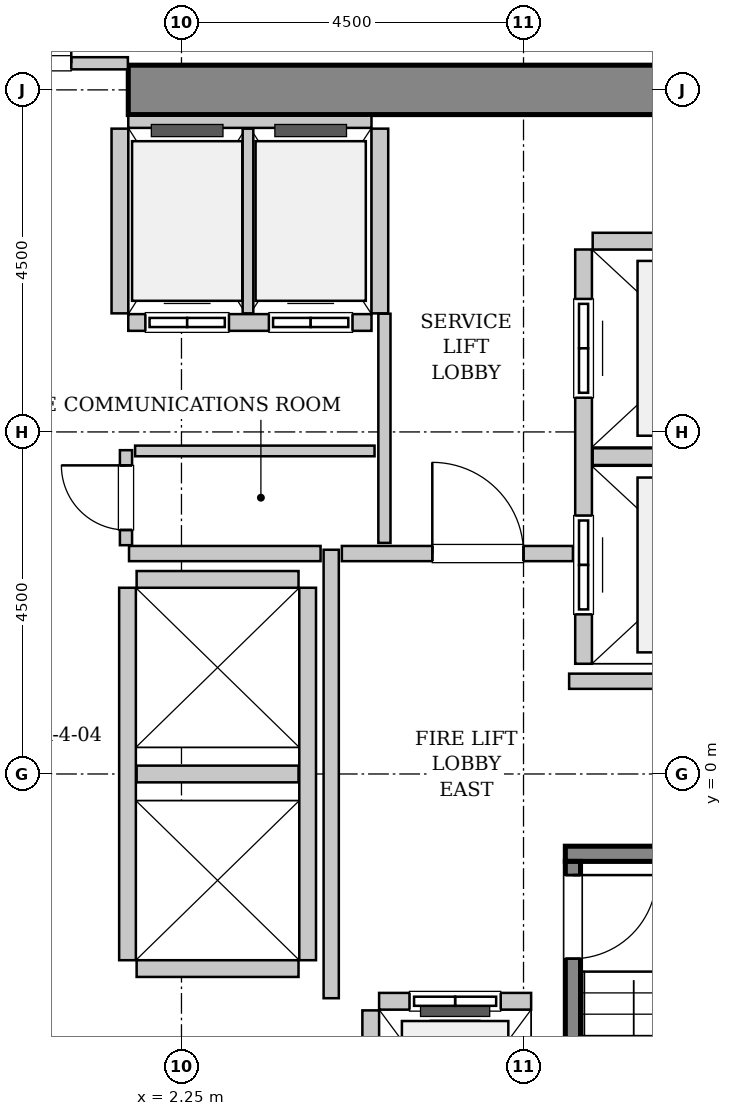
"""IFC4 building model, lengths in metres.
Left out: names, types, materials, properties, quantities, classifications, styles, units other than length and angle.
Written with IfcOpenShell. Run it as: python <this file> out.ifc"""

import sys

from ifc_helpers import new_model, si_unit, direction, frame, frame_2d, origin, place, context, subcontext, project, spatial, rectangle, extrude, source, transform, mapped, element, fill, save


model = new_model("IFC4")
c1 = context("Model", 3, precision=1e-05, world=origin(), true_north=direction((0.0, 1.0)))
c2 = subcontext(c1, "Body", "Model", "MODEL_VIEW")
j1 = project(units=[si_unit("LENGTHUNIT", "METRE"), si_unit("PLANEANGLEUNIT", "RADIAN")], contexts=[c1])
p1 = place(None, origin())
s1 = spatial("IfcSite", under=j1, at=p1, CompositionType="ELEMENT")
p2 = place(p1, origin())
s2 = spatial("IfcBuilding", under=s1, at=p2, CompositionType="ELEMENT")
p3 = place(p2, frame((0.0, 0.0, 22.2)))
s3 = spatial("IfcBuildingStorey", under=s2, at=p3, CompositionType="ELEMENT", Elevation=22.2)
m1 = source(origin(), c2, "Body", "SweptSolid", [
    extrude(rectangle(XDim=10.025, YDim=0.65, at=frame_2d((5.012, 0.0))), origin(), (0.0, 0.0, 1.0), 5.4),
])
p4 = place(p3, frame((1.55, 9.0, 0.0), z_axis=(0.0, 0.0, 1.0), x_axis=(1.0, 0.0, 0.0)))
e1 = element("IfcWall", 1, at=p4, inside=s3, PredefinedType="SHEAR", context=c2, shape_type="MappedRepresentation", body=[
    mapped(m1, transform((0.0, 0.0, 0.0), x_axis=(1.0, 0.0, 0.0), y_axis=(0.0, 1.0, 0.0), z_axis=(0.0, 0.0, 1.0), scale=1.0)),
])
m2 = source(origin(), c2, "Body", "SweptSolid", [
    extrude(rectangle(XDim=3.4, YDim=0.2, at=frame_2d((1.7, 0.0))), origin(), (0.0, 0.0, 1.0), 5.4),
])
p5 = place(p3, frame((7.3, -1.05, 0.0), z_axis=(0.0, 0.0, 1.0), x_axis=(1.0, 0.0, 0.0)))
e2 = element("IfcWall", 2, at=p5, inside=s3, PredefinedType="SOLIDWALL", context=c2, shape_type="MappedRepresentation", body=[
    mapped(m2, transform((0.0, 0.0, 0.0), x_axis=(1.0, 0.0, 0.0), y_axis=(0.0, 1.0, 0.0), z_axis=(0.0, 0.0, 1.0), scale=1.0)),
])
m3 = source(origin(), c2, "Body", "SweptSolid", [
    extrude(rectangle(XDim=7.1, YDim=0.2, at=frame_2d((3.55, 0.0))), origin(), (0.0, 0.0, 1.0), 5.4),
])
p6 = place(p3, frame((7.4, -1.15, 0.0), z_axis=(0.0, 0.0, 1.0), x_axis=(0.0, -1.0, 0.0)))
e3 = element("IfcWall", 3, at=p6, inside=s3, PredefinedType="SOLIDWALL", context=c2, shape_type="MappedRepresentation", body=[
    mapped(m3, transform((0.0, 0.0, 0.0), x_axis=(1.0, 0.0, 0.0), y_axis=(0.0, 1.0, 0.0), z_axis=(0.0, 0.0, 1.0), scale=1.0)),
])
p7 = place(p6, frame((0.18, 0.0, 0.0)))
e4 = element("IfcOpeningElement", 4, at=p7, cuts=e3, PredefinedType="OPENING", context=c2, shape_type="SweptSolid", body=[
    extrude(rectangle(XDim=1.1, YDim=2.15, at=frame_2d((0.55, 1.075))), frame((0.0, 0.11, 0.0), z_axis=(0.0, -1.0, 0.0), x_axis=(1.0, 0.0, 0.0)), (0.0, 0.0, 1.0), 0.22),
])
m4 = source(origin(), c2, "Body", "SweptSolid", [
    extrude(rectangle(XDim=2.0, YDim=0.22, at=frame_2d((1.0, 0.0))), origin(), (0.0, 0.0, 1.0), 4.905),
])
p8 = place(p3, frame((6.85, -2.99, 0.0), z_axis=(0.0, 0.0, 1.0), x_axis=(-1.0, 0.0, 0.0)))
e5 = element("IfcWall", 5, at=p8, inside=s3, PredefinedType="SOLIDWALL", context=c2, shape_type="MappedRepresentation", body=[
    mapped(m4, transform((0.0, 0.0, 0.0), x_axis=(1.0, 0.0, 0.0), y_axis=(0.0, 1.0, 0.0), z_axis=(0.0, 0.0, 1.0), scale=1.0)),
])
p9 = place(p8, frame((0.4, 0.0, 0.0)))
e6 = element("IfcOpeningElement", 6, at=p9, cuts=e5, PredefinedType="OPENING", context=c2, shape_type="SweptSolid", body=[
    extrude(rectangle(XDim=1.2, YDim=2.2, at=frame_2d((0.6, 1.1))), frame((0.0, 0.12, 0.0), z_axis=(0.0, -1.0, 0.0), x_axis=(1.0, 0.0, 0.0)), (0.0, 0.0, 1.0), 0.24),
])
m5 = source(origin(), c2, "Body", "SweptSolid", [
    extrude(rectangle(XDim=2.68, YDim=0.22, at=frame_2d((1.34, 0.0))), origin(), (0.0, 0.0, 1.0), 4.905),
])
p10 = place(p3, frame((4.74, -3.11, 0.0), z_axis=(0.0, 0.0, 1.0), x_axis=(0.0, -1.0, 0.0)))
e7 = element("IfcWall", 7, at=p10, inside=s3, PredefinedType="SOLIDWALL", context=c2, shape_type="MappedRepresentation", body=[
    mapped(m5, transform((0.0, 0.0, 0.0), x_axis=(1.0, 0.0, 0.0), y_axis=(0.0, 1.0, 0.0), z_axis=(0.0, 0.0, 1.0), scale=1.0)),
])
m6 = source(origin(), c2, "Body", "SweptSolid", [
    extrude(rectangle(XDim=5.45, YDim=0.22, at=frame_2d((2.725, 0.0))), origin(), (0.0, 0.0, 1.0), 4.905),
])
p11 = place(p3, frame((7.54, 6.9, 0.0), z_axis=(0.0, 0.0, 1.0), x_axis=(0.0, -1.0, 0.0)))
e8 = element("IfcWall", 8, at=p11, inside=s3, PredefinedType="SOLIDWALL", context=c2, shape_type="MappedRepresentation", body=[
    mapped(m6, transform((0.0, 0.0, 0.0), x_axis=(1.0, 0.0, 0.0), y_axis=(0.0, 1.0, 0.0), z_axis=(0.0, 0.0, 1.0), scale=1.0)),
])
p12 = place(p11, frame((3.5, 0.0, 0.0)))
e9 = element("IfcOpeningElement", 9, at=p12, cuts=e8, PredefinedType="OPENING", context=c2, shape_type="SweptSolid", body=[
    extrude(rectangle(XDim=1.3, YDim=2.3, at=frame_2d((0.65, 1.15))), frame((0.0, 0.12, 0.0), z_axis=(0.0, -1.0, 0.0), x_axis=(1.0, 0.0, 0.0)), (0.0, 0.0, 1.0), 0.24),
])
p13 = place(p11, frame((0.65, 0.0, 0.0)))
e10 = element("IfcOpeningElement", 10, at=p13, cuts=e8, PredefinedType="OPENING", context=c2, shape_type="SweptSolid", body=[
    extrude(rectangle(XDim=1.3, YDim=2.3, at=frame_2d((0.65, 1.15))), frame((0.0, 0.12, 0.0), z_axis=(0.0, -1.0, 0.0), x_axis=(1.0, 0.0, 0.0)), (0.0, 0.0, 1.0), 0.24),
])
m7 = source(origin(), c2, "Body", "SweptSolid", [
    extrude(rectangle(XDim=2.78, YDim=0.22, at=frame_2d((1.39, 0.0))), origin(), (0.0, 0.0, 1.0), 4.905),
])
for number, where, z_axis, x_axis in (
    (11, (7.66, 4.175, 0.0), (0.0, 0.0, 1.0), (1.0, 0.0, 0.0)),
    (12, (10.44, 7.01, 0.0), (0.0, 0.0, 1.0), (-1.0, 0.0, 0.0)),
):
    element("IfcWall", number, at=place(p3, frame(where, z_axis=z_axis, x_axis=x_axis)), inside=s3, PredefinedType="SOLIDWALL", context=c2, shape_type="MappedRepresentation", body=[
        mapped(m7, transform((0.0, 0.0, 0.0), x_axis=(1.0, 0.0, 0.0), y_axis=(0.0, 1.0, 0.0), z_axis=(0.0, 0.0, 1.0), scale=1.0)),
    ])
m8 = source(origin(), c2, "Body", "SweptSolid", [
    extrude(rectangle(XDim=3.2, YDim=0.22, at=frame_2d((1.6, 0.0))), origin(), (0.0, 0.0, 1.0), 4.905),
])
p14 = place(p3, frame((1.55, 5.94, 0.0), z_axis=(0.0, 0.0, 1.0), x_axis=(1.0, 0.0, 0.0)))
e13 = element("IfcWall", 13, at=p14, inside=s3, PredefinedType="SOLIDWALL", context=c2, shape_type="MappedRepresentation", body=[
    mapped(m8, transform((0.0, 0.0, 0.0), x_axis=(1.0, 0.0, 0.0), y_axis=(0.0, 1.0, 0.0), z_axis=(0.0, 0.0, 1.0), scale=1.0)),
])
p15 = place(p14, frame((0.225, 0.0, 0.0)))
e14 = element("IfcOpeningElement", 14, at=p15, cuts=e13, PredefinedType="OPENING", context=c2, shape_type="SweptSolid", body=[
    extrude(rectangle(XDim=1.1, YDim=2.2, at=frame_2d((0.55, 1.1))), frame((0.0, 0.12, 0.0), z_axis=(0.0, -1.0, 0.0), x_axis=(1.0, 0.0, 0.0)), (0.0, 0.0, 1.0), 0.24),
])
p16 = place(p14, frame((1.85, 0.0, 0.0)))
e15 = element("IfcOpeningElement", 15, at=p16, cuts=e13, PredefinedType="OPENING", context=c2, shape_type="SweptSolid", body=[
    extrude(rectangle(XDim=1.1, YDim=2.2, at=frame_2d((0.55, 1.1))), frame((0.0, 0.12, 0.0), z_axis=(0.0, -1.0, 0.0), x_axis=(1.0, 0.0, 0.0)), (0.0, 0.0, 1.0), 0.24),
])
m9 = source(origin(), c2, "Body", "SweptSolid", [
    extrude(rectangle(XDim=3.2, YDim=0.16, at=frame_2d((1.6, 0.0))), origin(), (0.0, 0.0, 1.0), 3.795),
])
p17 = place(p3, frame((4.75, 8.58, 0.0), z_axis=(0.0, 0.0, 1.0), x_axis=(-1.0, 0.0, 0.0)))
e16 = element("IfcWall", 16, at=p17, inside=s3, PredefinedType="PARTITIONING", context=c2, shape_type="MappedRepresentation", body=[
    mapped(m9, transform((0.0, 0.0, 0.0), x_axis=(1.0, 0.0, 0.0), y_axis=(0.0, 1.0, 0.0), z_axis=(0.0, 0.0, 1.0), scale=1.0)),
])
m10 = source(origin(), c2, "Body", "SweptSolid", [
    extrude(rectangle(XDim=2.43, YDim=0.22, at=frame_2d((1.215, 0.0))), origin(), (0.0, 0.0, 1.0), 4.905),
])
p18 = place(p3, frame((1.44, 8.49, 0.0), z_axis=(0.0, 0.0, 1.0), x_axis=(0.0, -1.0, 0.0)))
e17 = element("IfcWall", 17, at=p18, inside=s3, PredefinedType="SOLIDWALL", context=c2, shape_type="MappedRepresentation", body=[
    mapped(m10, transform((0.0, 0.0, 0.0), x_axis=(1.0, 0.0, 0.0), y_axis=(0.0, 1.0, 0.0), z_axis=(0.0, 0.0, 1.0), scale=1.0)),
])
m11 = source(origin(), c2, "Body", "SweptSolid", [
    extrude(rectangle(XDim=2.43, YDim=0.14, at=frame_2d((1.215, 0.0))), origin(), (0.0, 0.0, 1.0), 4.905),
])
p19 = place(p3, frame((3.125, 6.06, 0.0), z_axis=(0.0, 0.0, 1.0), x_axis=(0.0, 1.0, 0.0)))
e18 = element("IfcWall", 18, at=p19, inside=s3, PredefinedType="PARTITIONING", context=c2, shape_type="MappedRepresentation", body=[
    mapped(m11, transform((0.0, 0.0, 0.0), x_axis=(1.0, 0.0, 0.0), y_axis=(0.0, 1.0, 0.0), z_axis=(0.0, 0.0, 1.0), scale=1.0)),
])
p20 = place(p3, frame((4.86, 6.06, 0.0), z_axis=(0.0, 0.0, 1.0), x_axis=(0.0, 1.0, 0.0)))
e19 = element("IfcWall", 19, at=p20, inside=s3, PredefinedType="SOLIDWALL", context=c2, shape_type="MappedRepresentation", body=[
    mapped(m10, transform((0.0, 0.0, 0.0), x_axis=(1.0, 0.0, 0.0), y_axis=(0.0, 1.0, 0.0), z_axis=(0.0, 0.0, 1.0), scale=1.0)),
])
m12 = source(origin(), c2, "Body", "SweptSolid", [
    extrude(rectangle(XDim=4.9, YDim=0.22, at=frame_2d((2.45, 0.0))), origin(), (0.0, 0.0, 1.0), 4.905),
])
for number, where, z_axis, x_axis in (
    (20, (1.54, 2.45, 0.0), (0.0, 0.0, 1.0), (0.0, -1.0, 0.0)),
    (21, (3.91, -2.45, 0.0), (0.0, 0.0, 1.0), (0.0, 1.0, 0.0)),
):
    element("IfcWall", number, at=place(p3, frame(where, z_axis=z_axis, x_axis=x_axis)), inside=s3, PredefinedType="SOLIDWALL", context=c2, shape_type="MappedRepresentation", body=[
        mapped(m12, transform((0.0, 0.0, 0.0), x_axis=(1.0, 0.0, 0.0), y_axis=(0.0, 1.0, 0.0), z_axis=(0.0, 0.0, 1.0), scale=1.0)),
    ])
m13 = source(origin(), c2, "Body", "SweptSolid", [
    extrude(rectangle(XDim=2.13, YDim=0.22, at=frame_2d((1.065, 0.0))), origin(), (0.0, 0.0, 1.0), 4.905),
])
for number, where, z_axis, x_axis in (
    (22, (1.66, -2.56, 0.0), (0.0, 0.0, 1.0), (1.0, 0.0, 0.0)),
    (23, (1.66, 0.0, 0.0), (0.0, 0.0, 1.0), (1.0, 0.0, 0.0)),
    (24, (3.79, 2.56, 0.0), (0.0, 0.0, 1.0), (-1.0, 0.0, 0.0)),
):
    element("IfcWall", number, at=place(p3, frame(where, z_axis=z_axis, x_axis=x_axis)), inside=s3, PredefinedType="SOLIDWALL", context=c2, shape_type="MappedRepresentation", body=[
        mapped(m13, transform((0.0, 0.0, 0.0), x_axis=(1.0, 0.0, 0.0), y_axis=(0.0, 1.0, 0.0), z_axis=(0.0, 0.0, 1.0), scale=1.0)),
    ])
m14 = source(origin(), c2, "Body", "SweptSolid", [
    extrude(rectangle(XDim=5.9, YDim=0.2, at=frame_2d((2.95, 0.0))), origin(), (0.0, 0.0, 1.0), 4.905),
])
p21 = place(p3, frame((4.22, -2.95, 0.0), z_axis=(0.0, 0.0, 1.0), x_axis=(0.0, 1.0, 0.0)))
e25 = element("IfcWall", 25, at=p21, inside=s3, PredefinedType="PARTITIONING", context=c2, shape_type="MappedRepresentation", body=[
    mapped(m14, transform((0.0, 0.0, 0.0), x_axis=(1.0, 0.0, 0.0), y_axis=(0.0, 1.0, 0.0), z_axis=(0.0, 0.0, 1.0), scale=1.0)),
])
m15 = source(origin(), c2, "Body", "SweptSolid", [
    extrude(rectangle(XDim=2.52, YDim=0.2, at=frame_2d((1.26, 0.0))), origin(), (0.0, 0.0, 1.0), 4.905),
])
p22 = place(p3, frame((1.56, 2.9, 0.0), z_axis=(0.0, 0.0, 1.0), x_axis=(1.0, 0.0, 0.0)))
e26 = element("IfcWall", 26, at=p22, inside=s3, PredefinedType="PARTITIONING", context=c2, shape_type="MappedRepresentation", body=[
    mapped(m15, transform((0.0, 0.0, 0.0), x_axis=(1.0, 0.0, 0.0), y_axis=(0.0, 1.0, 0.0), z_axis=(0.0, 0.0, 1.0), scale=1.0)),
])
m16 = source(origin(), c2, "Body", "SweptSolid", [
    extrude(rectangle(XDim=3.04, YDim=0.2, at=frame_2d((1.52, 0.0))), origin(), (0.0, 0.0, 1.0), 4.905),
])
p23 = place(p3, frame((4.36, 2.9, 0.0), z_axis=(0.0, 0.0, 1.0), x_axis=(1.0, 0.0, 0.0)))
e27 = element("IfcWall", 27, at=p23, inside=s3, PredefinedType="PARTITIONING", context=c2, shape_type="MappedRepresentation", body=[
    mapped(m16, transform((0.0, 0.0, 0.0), x_axis=(1.0, 0.0, 0.0), y_axis=(0.0, 1.0, 0.0), z_axis=(0.0, 0.0, 1.0), scale=1.0)),
])
p24 = place(p23, frame((1.19, 0.0, 0.0)))
e28 = element("IfcOpeningElement", 28, at=p24, cuts=e27, PredefinedType="OPENING", context=c2, shape_type="SweptSolid", body=[
    extrude(rectangle(XDim=1.2, YDim=2.15, at=frame_2d((0.6, 1.075))), frame((0.0, 0.11, 0.0), z_axis=(0.0, -1.0, 0.0), x_axis=(1.0, 0.0, 0.0)), (0.0, 0.0, 1.0), 0.22),
])
m17 = source(origin(), c2, "Body", "SweptSolid", [
    extrude(rectangle(XDim=4.11, YDim=0.2, at=frame_2d((2.055, 0.0))), origin(), (0.0, 0.0, 1.0), 4.905),
])
p25 = place(p3, frame((7.35, 1.22, 0.0), z_axis=(0.0, 0.0, 1.0), x_axis=(1.0, 0.0, 0.0)))
e29 = element("IfcWall", 29, at=p25, inside=s3, PredefinedType="PARTITIONING", context=c2, shape_type="MappedRepresentation", body=[
    mapped(m17, transform((0.0, 0.0, 0.0), x_axis=(1.0, 0.0, 0.0), y_axis=(0.0, 1.0, 0.0), z_axis=(0.0, 0.0, 1.0), scale=1.0)),
])
m18 = source(origin(), c2, "Body", "SweptSolid", [
    extrude(rectangle(XDim=3.09, YDim=0.16, at=frame_2d((1.545, 0.0))), origin(), (0.0, 0.0, 1.0), 3.795),
])
p26 = place(p3, frame((-1.545, 9.35, 0.0), z_axis=(0.0, 0.0, 1.0), x_axis=(1.0, 0.0, 0.0)))
e30 = element("IfcWall", 30, at=p26, inside=s3, PredefinedType="PARTITIONING", context=c2, shape_type="MappedRepresentation", body=[
    mapped(m18, transform((0.0, 0.0, 0.0), x_axis=(1.0, 0.0, 0.0), y_axis=(0.0, 1.0, 0.0), z_axis=(0.0, 0.0, 1.0), scale=1.0)),
])
p27 = place(p26, frame((0.745, 0.0, 0.0)))
e31 = element("IfcOpeningElement", 31, at=p27, cuts=e30, PredefinedType="OPENING", context=c2, shape_type="SweptSolid", body=[
    extrude(rectangle(XDim=1.6, YDim=2.3, at=frame_2d((0.8, 1.15))), frame((0.0, 0.09, 0.0), z_axis=(0.0, -1.0, 0.0), x_axis=(1.0, 0.0, 0.0)), (0.0, 0.0, 1.0), 0.18),
])
m19 = source(origin(), c2, "Body", "SweptSolid", [
    extrude(rectangle(XDim=3.015, YDim=0.16, at=frame_2d((1.507, 0.0))), origin(), (0.0, 0.0, 1.0), 4.905),
])
p28 = place(p3, frame((4.92, 3.04, 0.0), z_axis=(0.0, 0.0, 1.0), x_axis=(0.0, 1.0, 0.0)))
e32 = element("IfcWall", 32, at=p28, inside=s3, PredefinedType="PARTITIONING", context=c2, shape_type="MappedRepresentation", body=[
    mapped(m19, transform((0.0, 0.0, 0.0), x_axis=(1.0, 0.0, 0.0), y_axis=(0.0, 1.0, 0.0), z_axis=(0.0, 0.0, 1.0), scale=1.0)),
])
m20 = source(origin(), c2, "Body", "SweptSolid", [
    extrude(rectangle(XDim=1.25, YDim=0.16, at=frame_2d((0.625, 0.0))), origin(), (0.0, 0.0, 1.0), 4.905),
])
p29 = place(p3, frame((1.52, 3.01, 0.0), z_axis=(0.0, 0.0, 1.0), x_axis=(0.0, 1.0, 0.0)))
e33 = element("IfcWall", 33, at=p29, inside=s3, PredefinedType="PARTITIONING", context=c2, shape_type="MappedRepresentation", body=[
    mapped(m20, transform((0.0, 0.0, 0.0), x_axis=(1.0, 0.0, 0.0), y_axis=(0.0, 1.0, 0.0), z_axis=(0.0, 0.0, 1.0), scale=1.0)),
])
p30 = place(p29, frame((0.2, 0.0, 0.0)))
e34 = element("IfcOpeningElement", 34, at=p30, cuts=e33, PredefinedType="OPENING", context=c2, shape_type="SweptSolid", body=[
    extrude(rectangle(XDim=0.85, YDim=2.1, at=frame_2d((0.425, 1.05))), frame((0.0, 0.09, 0.0), z_axis=(0.0, -1.0, 0.0), x_axis=(1.0, 0.0, 0.0)), (0.0, 0.0, 1.0), 0.18),
])
m21 = source(origin(), c2, "Body", "SweptSolid", [
    extrude(rectangle(XDim=3.15, YDim=0.14, at=frame_2d((1.575, 0.0))), origin(), (0.0, 0.0, 1.0), 4.905),
])
p31 = place(p3, frame((1.64, 4.25, 0.0), z_axis=(0.0, 0.0, 1.0), x_axis=(1.0, 0.0, 0.0)))
e35 = element("IfcWall", 35, at=p31, inside=s3, PredefinedType="PARTITIONING", context=c2, shape_type="MappedRepresentation", body=[
    mapped(m21, transform((0.0, 0.0, 0.0), x_axis=(1.0, 0.0, 0.0), y_axis=(0.0, 1.0, 0.0), z_axis=(0.0, 0.0, 1.0), scale=1.0)),
])
m22 = source(origin(), c2, "Body", "SweptSolid", [
    extrude(rectangle(XDim=1.1, YDim=2.15, at=frame_2d((0.55, 1.075))), frame((0.0, 0.025, 0.0), z_axis=(0.0, -1.0, 0.0), x_axis=(1.0, 0.0, 0.0)), (0.0, 0.0, 1.0), 0.05),
])
p32 = place(p7, origin())
e36 = element("IfcDoor", 36, at=p32, inside=s3, OperationType="SINGLE_SWING_LEFT", PredefinedType="DOOR", context=c2, shape_type="MappedRepresentation", body=[
    mapped(m22, transform((0.0, 0.0, 0.0), x_axis=(1.0, 0.0, 0.0), y_axis=(0.0, 1.0, 0.0), z_axis=(0.0, 0.0, 1.0), scale=1.0)),
])
fill(e4, e36)
m23 = source(origin(), c2, "Body", "SweptSolid", [
    extrude(rectangle(XDim=1.2, YDim=2.2, at=frame_2d((0.6, 1.1))), frame((0.0, 0.025, 0.0), z_axis=(0.0, -1.0, 0.0), x_axis=(1.0, 0.0, 0.0)), (0.0, 0.0, 1.0), 0.05),
])
p33 = place(p9, origin())
e37 = element("IfcDoor", 37, at=p33, inside=s3, OperationType="SLIDING_TO_LEFT", PredefinedType="DOOR", context=c2, shape_type="MappedRepresentation", body=[
    mapped(m23, transform((0.0, 0.0, 0.0), x_axis=(1.0, 0.0, 0.0), y_axis=(0.0, 1.0, 0.0), z_axis=(0.0, 0.0, 1.0), scale=1.0)),
])
fill(e6, e37)
m24 = source(origin(), c2, "Body", "SweptSolid", [
    extrude(rectangle(XDim=1.3, YDim=2.3, at=frame_2d((0.65, 1.15))), frame((0.0, 0.025, 0.0), z_axis=(0.0, -1.0, 0.0), x_axis=(1.0, 0.0, 0.0)), (0.0, 0.0, 1.0), 0.05),
])
p34 = place(p12, origin())
e38 = element("IfcDoor", 38, at=p34, inside=s3, OperationType="SLIDING_TO_RIGHT", PredefinedType="DOOR", context=c2, shape_type="MappedRepresentation", body=[
    mapped(m24, transform((0.0, 0.0, 0.0), x_axis=(1.0, 0.0, 0.0), y_axis=(0.0, 1.0, 0.0), z_axis=(0.0, 0.0, 1.0), scale=1.0)),
])
fill(e9, e38)
p35 = place(p13, origin())
e39 = element("IfcDoor", 39, at=p35, inside=s3, OperationType="SLIDING_TO_RIGHT", PredefinedType="DOOR", context=c2, shape_type="MappedRepresentation", body=[
    mapped(m24, transform((0.0, 0.0, 0.0), x_axis=(1.0, 0.0, 0.0), y_axis=(0.0, 1.0, 0.0), z_axis=(0.0, 0.0, 1.0), scale=1.0)),
])
fill(e10, e39)
m25 = source(origin(), c2, "Body", "SweptSolid", [
    extrude(rectangle(XDim=1.1, YDim=2.2, at=frame_2d((0.55, 1.1))), frame((0.0, 0.025, 0.0), z_axis=(0.0, -1.0, 0.0), x_axis=(1.0, 0.0, 0.0)), (0.0, 0.0, 1.0), 0.05),
])
p36 = place(p15, origin())
e40 = element("IfcDoor", 40, at=p36, inside=s3, OperationType="DOUBLE_DOOR_SLIDING", PredefinedType="DOOR", context=c2, shape_type="MappedRepresentation", body=[
    mapped(m25, transform((0.0, 0.0, 0.0), x_axis=(1.0, 0.0, 0.0), y_axis=(0.0, 1.0, 0.0), z_axis=(0.0, 0.0, 1.0), scale=1.0)),
])
fill(e14, e40)
p37 = place(p16, origin())
e41 = element("IfcDoor", 41, at=p37, inside=s3, OperationType="DOUBLE_DOOR_SLIDING", PredefinedType="DOOR", context=c2, shape_type="MappedRepresentation", body=[
    mapped(m25, transform((0.0, 0.0, 0.0), x_axis=(1.0, 0.0, 0.0), y_axis=(0.0, 1.0, 0.0), z_axis=(0.0, 0.0, 1.0), scale=1.0)),
])
fill(e15, e41)
m26 = source(origin(), c2, "Body", "SweptSolid", [
    extrude(rectangle(XDim=1.2, YDim=2.15, at=frame_2d((0.6, 1.075))), frame((0.0, 0.025, 0.0), z_axis=(0.0, -1.0, 0.0), x_axis=(1.0, 0.0, 0.0)), (0.0, 0.0, 1.0), 0.05),
])
p38 = place(p24, origin())
e42 = element("IfcDoor", 42, at=p38, inside=s3, OperationType="SINGLE_SWING_LEFT", PredefinedType="DOOR", context=c2, shape_type="MappedRepresentation", body=[
    mapped(m26, transform((0.0, 0.0, 0.0), x_axis=(1.0, 0.0, 0.0), y_axis=(0.0, 1.0, 0.0), z_axis=(0.0, 0.0, 1.0), scale=1.0)),
])
fill(e28, e42)
m27 = source(origin(), c2, "Body", "SweptSolid", [
    extrude(rectangle(XDim=1.6, YDim=2.3, at=frame_2d((0.8, 1.15))), frame((0.0, 0.025, 0.0), z_axis=(0.0, -1.0, 0.0), x_axis=(1.0, 0.0, 0.0)), (0.0, 0.0, 1.0), 0.05),
])
p39 = place(p27, origin())
e43 = element("IfcDoor", 43, at=p39, inside=s3, OperationType="DOUBLE_DOOR_SINGLE_SWING", PredefinedType="DOOR", context=c2, shape_type="MappedRepresentation", body=[
    mapped(m27, transform((0.0, 0.0, 0.0), x_axis=(1.0, 0.0, 0.0), y_axis=(0.0, 1.0, 0.0), z_axis=(0.0, 0.0, 1.0), scale=1.0)),
])
fill(e31, e43)
m28 = source(origin(), c2, "Body", "SweptSolid", [
    extrude(rectangle(XDim=0.85, YDim=2.1, at=frame_2d((0.425, 1.05))), frame((0.0, 0.025, 0.0), z_axis=(0.0, -1.0, 0.0), x_axis=(1.0, 0.0, 0.0)), (0.0, 0.0, 1.0), 0.05),
])
p40 = place(p30, origin())
e44 = element("IfcDoor", 44, at=p40, inside=s3, OperationType="SINGLE_SWING_RIGHT", PredefinedType="DOOR", context=c2, shape_type="MappedRepresentation", body=[
    mapped(m28, transform((0.0, 0.0, 0.0), x_axis=(1.0, 0.0, 0.0), y_axis=(0.0, 1.0, 0.0), z_axis=(0.0, 0.0, 1.0), scale=1.0)),
])
fill(e34, e44)
save(model, sys.argv[1])
